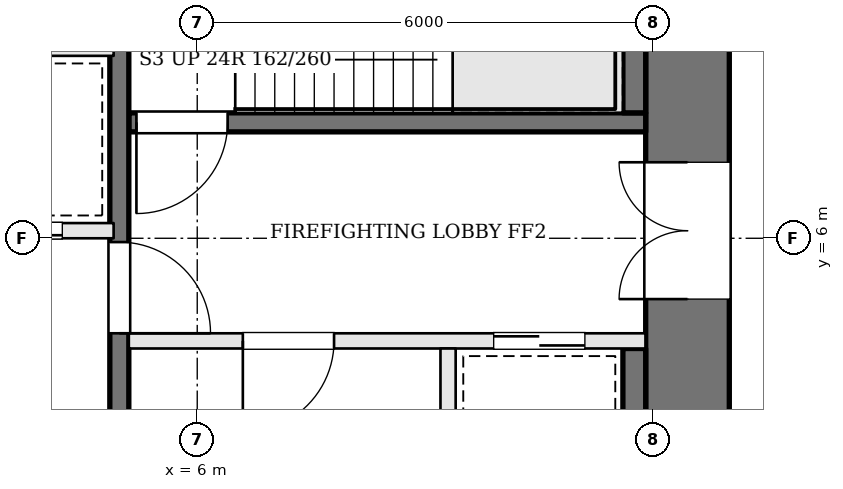
"""IFC4 building model, lengths in metres.
Left out: names, types, materials, properties, quantities, classifications, styles, units other than length and angle.
Written with IfcOpenShell. Run it as: python <this file> out.ifc"""

import sys

from ifc_helpers import new_model, si_unit, direction, frame, frame_2d, origin, place, context, subcontext, project, spatial, rectangle, extrude, element, fill, save


model = new_model("IFC4")
c1 = context("Model", 3, precision=1e-05, world=origin(), true_north=direction((0.0, 1.0)))
c2 = subcontext(c1, "Body", "Model", "MODEL_VIEW")
j1 = project(units=[si_unit("LENGTHUNIT", "METRE"), si_unit("PLANEANGLEUNIT", "RADIAN")], contexts=[c1])
p1 = place(None, origin())
s1 = spatial("IfcSite", under=j1, at=p1, CompositionType="ELEMENT")
p2 = place(p1, origin())
s2 = spatial("IfcBuilding", under=s1, at=p2, CompositionType="ELEMENT")
p3 = place(p2, frame((0.0, 0.0, 130.5)))
s3 = spatial("IfcBuildingStorey", under=s2, at=p3, CompositionType="ELEMENT", Elevation=130.5)
p4 = place(p3, frame((12.45, -1.9, 0.0), z_axis=(0.0, 0.0, 1.0), x_axis=(0.0, 1.0, 0.0)))
e1 = element("IfcWall", 1, at=p4, inside=s3, PredefinedType="SHEAR", context=c2, shape_type="SweptSolid", body=[
    extrude(rectangle(XDim=12.8, YDim=1.1, at=frame_2d((6.4, 0.0))), origin(), (0.0, 0.0, 1.0), 3.9),
])
p5 = place(p4, frame((7.1, 0.0, 0.0)))
e2 = element("IfcOpeningElement", 2, at=p5, cuts=e1, PredefinedType="OPENING", context=c2, shape_type="SweptSolid", body=[
    extrude(rectangle(XDim=1.8, YDim=2.1, at=frame_2d((0.9, 1.05))), frame((0.0, 0.56, 0.0), z_axis=(0.0, -1.0, 0.0), x_axis=(1.0, 0.0, 0.0)), (0.0, 0.0, 1.0), 1.12),
])
p6 = place(p3, frame((11.9, 7.525, 0.0), z_axis=(0.0, 0.0, 1.0), x_axis=(-1.0, 0.0, 0.0)))
e3 = element("IfcWall", 3, at=p6, inside=s3, PredefinedType="SOLIDWALL", context=c2, shape_type="SweptSolid", body=[
    extrude(rectangle(XDim=6.8, YDim=0.25, at=frame_2d((3.4, 0.0))), origin(), (0.0, 0.0, 1.0), 3.7),
])
p7 = place(p6, frame((5.5, 0.0, 0.0)))
e4 = element("IfcOpeningElement", 4, at=p7, cuts=e3, PredefinedType="OPENING", context=c2, shape_type="SweptSolid", body=[
    extrude(rectangle(XDim=1.2, YDim=2.1, at=frame_2d((0.6, 1.05))), frame((0.0, 0.135, 0.0), z_axis=(0.0, -1.0, 0.0), x_axis=(1.0, 0.0, 0.0)), (0.0, 0.0, 1.0), 0.27),
])
p8 = place(p3, frame((11.9, 4.65, 0.0), z_axis=(0.0, 0.0, 1.0), x_axis=(-1.0, 0.0, 0.0)))
e5 = element("IfcWall", 5, at=p8, inside=s3, PredefinedType="SOLIDWALL", context=c2, shape_type="SweptSolid", body=[
    extrude(rectangle(XDim=6.8, YDim=0.2, at=frame_2d((3.4, 0.0))), origin(), (0.0, 0.0, 1.0), 3.7),
])
p9 = place(p8, frame((4.1, 0.0, 0.0)))
e6 = element("IfcOpeningElement", 6, at=p9, cuts=e5, PredefinedType="OPENING", context=c2, shape_type="SweptSolid", body=[
    extrude(rectangle(XDim=1.2, YDim=2.1, at=frame_2d((0.6, 1.05))), frame((0.0, 0.11, 0.0), z_axis=(0.0, -1.0, 0.0), x_axis=(1.0, 0.0, 0.0)), (0.0, 0.0, 1.0), 0.22),
])
p10 = place(p8, frame((0.8, 0.0, 0.0)))
e7 = element("IfcOpeningElement", 7, at=p10, cuts=e5, PredefinedType="OPENING", context=c2, shape_type="SweptSolid", body=[
    extrude(rectangle(XDim=1.2, YDim=2.1, at=frame_2d((0.6, 1.05))), frame((0.0, 0.11, 0.0), z_axis=(0.0, -1.0, 0.0), x_axis=(1.0, 0.0, 0.0)), (0.0, 0.0, 1.0), 0.22),
])
p11 = place(p3, frame((9.3, 4.55, 0.0), z_axis=(0.0, 0.0, 1.0), x_axis=(0.0, -1.0, 0.0)))
e8 = element("IfcWall", 8, at=p11, inside=s3, PredefinedType="SOLIDWALL", context=c2, shape_type="SweptSolid", body=[
    extrude(rectangle(XDim=3.0, YDim=0.2, at=frame_2d((1.5, 0.0))), origin(), (0.0, 0.0, 1.0), 3.7),
])
p12 = place(p3, frame((4.975, 10.9, 0.0), z_axis=(0.0, 0.0, 1.0), x_axis=(0.0, -1.0, 0.0)))
e9 = element("IfcWall", 9, at=p12, inside=s3, PredefinedType="SOLIDWALL", context=c2, shape_type="SweptSolid", body=[
    extrude(rectangle(XDim=12.8, YDim=0.25, at=frame_2d((6.4, 0.0))), origin(), (0.0, 0.0, 1.0), 3.7),
])
p13 = place(p12, frame((4.95, 0.0, 0.0)))
e10 = element("IfcOpeningElement", 10, at=p13, cuts=e9, PredefinedType="OPENING", context=c2, shape_type="SweptSolid", body=[
    extrude(rectangle(XDim=1.2, YDim=2.1, at=frame_2d((0.6, 1.05))), frame((0.0, 0.135, 0.0), z_axis=(0.0, -1.0, 0.0), x_axis=(1.0, 0.0, 0.0)), (0.0, 0.0, 1.0), 0.27),
])
p14 = place(p3, frame((11.75, 10.6, 0.0), z_axis=(0.0, 0.0, 1.0), x_axis=(0.0, -1.0, 0.0)))
e11 = element("IfcWall", 11, at=p14, inside=s3, PredefinedType="SOLIDWALL", context=c2, shape_type="SweptSolid", body=[
    extrude(rectangle(XDim=2.95, YDim=0.3, at=frame_2d((1.475, 0.0))), origin(), (0.0, 0.0, 1.0), 3.7),
])
p15 = place(p3, frame((11.75, 4.55, 0.0), z_axis=(0.0, 0.0, 1.0), x_axis=(0.0, -1.0, 0.0)))
e12 = element("IfcWall", 12, at=p15, inside=s3, PredefinedType="SOLIDWALL", context=c2, shape_type="SweptSolid", body=[
    extrude(rectangle(XDim=3.0, YDim=0.3, at=frame_2d((1.5, 0.0))), origin(), (0.0, 0.0, 1.0), 3.7),
])
p16 = place(p3, frame((-4.9, 6.1, 0.0), z_axis=(0.0, 0.0, 1.0), x_axis=(1.0, 0.0, 0.0)))
e13 = element("IfcWall", 13, at=p16, inside=s3, PredefinedType="SOLIDWALL", context=c2, shape_type="SweptSolid", body=[
    extrude(rectangle(XDim=9.8, YDim=0.2, at=frame_2d((4.9, 0.0))), origin(), (0.0, 0.0, 1.0), 3.7),
])
p17 = place(p16, frame((0.675, 0.0, 0.0)))
e14 = element("IfcOpeningElement", 14, at=p17, cuts=e13, PredefinedType="OPENING", context=c2, shape_type="SweptSolid", body=[
    extrude(rectangle(XDim=1.1, YDim=2.1, at=frame_2d((0.55, 1.05))), frame((0.0, 0.11, 0.0), z_axis=(0.0, -1.0, 0.0), x_axis=(1.0, 0.0, 0.0)), (0.0, 0.0, 1.0), 0.22),
])
p18 = place(p16, frame((3.125, 0.0, 0.0)))
e15 = element("IfcOpeningElement", 15, at=p18, cuts=e13, PredefinedType="OPENING", context=c2, shape_type="SweptSolid", body=[
    extrude(rectangle(XDim=1.1, YDim=2.1, at=frame_2d((0.55, 1.05))), frame((0.0, 0.11, 0.0), z_axis=(0.0, -1.0, 0.0), x_axis=(1.0, 0.0, 0.0)), (0.0, 0.0, 1.0), 0.22),
])
p19 = place(p16, frame((5.575, 0.0, 0.0)))
e16 = element("IfcOpeningElement", 16, at=p19, cuts=e13, PredefinedType="OPENING", context=c2, shape_type="SweptSolid", body=[
    extrude(rectangle(XDim=1.1, YDim=2.1, at=frame_2d((0.55, 1.05))), frame((0.0, 0.11, 0.0), z_axis=(0.0, -1.0, 0.0), x_axis=(1.0, 0.0, 0.0)), (0.0, 0.0, 1.0), 0.22),
])
p20 = place(p16, frame((8.025, 0.0, 0.0)))
e17 = element("IfcOpeningElement", 17, at=p20, cuts=e13, PredefinedType="OPENING", context=c2, shape_type="SweptSolid", body=[
    extrude(rectangle(XDim=1.1, YDim=2.1, at=frame_2d((0.55, 1.05))), frame((0.0, 0.11, 0.0), z_axis=(0.0, -1.0, 0.0), x_axis=(1.0, 0.0, 0.0)), (0.0, 0.0, 1.0), 0.22),
])
p21 = place(p3, frame((-4.9, 8.5, 0.0), z_axis=(0.0, 0.0, 1.0), x_axis=(1.0, 0.0, 0.0)))
e18 = element("IfcWall", 18, at=p21, inside=s3, PredefinedType="SOLIDWALL", context=c2, shape_type="SweptSolid", body=[
    extrude(rectangle(XDim=9.8, YDim=0.2, at=frame_2d((4.9, 0.0))), origin(), (0.0, 0.0, 1.0), 3.7),
])
p22 = place(p5, origin())
e19 = element("IfcDoor", 19, at=p22, inside=s3, OperationType="DOUBLE_DOOR_SINGLE_SWING", PredefinedType="DOOR", context=c2, shape_type="SweptSolid", body=[
    extrude(rectangle(XDim=1.8, YDim=2.1, at=frame_2d((0.9, 1.05))), frame((0.0, 0.025, 0.0), z_axis=(0.0, -1.0, 0.0), x_axis=(1.0, 0.0, 0.0)), (0.0, 0.0, 1.0), 0.05),
])
fill(e2, e19)
p23 = place(p13, origin())
e20 = element("IfcDoor", 20, at=p23, inside=s3, OperationType="SINGLE_SWING_RIGHT", PredefinedType="DOOR", context=c2, shape_type="SweptSolid", body=[
    extrude(rectangle(XDim=1.2, YDim=2.1, at=frame_2d((0.6, 1.05))), frame((0.0, 0.025, 0.0), z_axis=(0.0, -1.0, 0.0), x_axis=(1.0, 0.0, 0.0)), (0.0, 0.0, 1.0), 0.05),
])
fill(e10, e20)
p24 = place(p9, origin())
e21 = element("IfcDoor", 21, at=p24, inside=s3, OperationType="SINGLE_SWING_RIGHT", PredefinedType="DOOR", context=c2, shape_type="SweptSolid", body=[
    extrude(rectangle(XDim=1.2, YDim=2.1, at=frame_2d((0.6, 1.05))), frame((0.0, 0.025, 0.0), z_axis=(0.0, -1.0, 0.0), x_axis=(1.0, 0.0, 0.0)), (0.0, 0.0, 1.0), 0.05),
])
fill(e6, e21)
p25 = place(p7, origin())
e22 = element("IfcDoor", 22, at=p25, inside=s3, OperationType="SINGLE_SWING_RIGHT", PredefinedType="DOOR", context=c2, shape_type="SweptSolid", body=[
    extrude(rectangle(XDim=1.2, YDim=2.1, at=frame_2d((0.6, 1.05))), frame((0.0, 0.025, 0.0), z_axis=(0.0, -1.0, 0.0), x_axis=(1.0, 0.0, 0.0)), (0.0, 0.0, 1.0), 0.05),
])
fill(e4, e22)
p26 = place(p10, origin())
e23 = element("IfcDoor", 23, at=p26, inside=s3, OperationType="SLIDING_TO_RIGHT", PredefinedType="DOOR", context=c2, shape_type="SweptSolid", body=[
    extrude(rectangle(XDim=1.2, YDim=2.1, at=frame_2d((0.6, 1.05))), frame((0.0, 0.025, 0.0), z_axis=(0.0, -1.0, 0.0), x_axis=(1.0, 0.0, 0.0)), (0.0, 0.0, 1.0), 0.05),
])
fill(e7, e23)
p27 = place(p20, origin())
e24 = element("IfcDoor", 24, at=p27, inside=s3, OperationType="SLIDING_TO_LEFT", PredefinedType="DOOR", context=c2, shape_type="SweptSolid", body=[
    extrude(rectangle(XDim=1.1, YDim=2.1, at=frame_2d((0.55, 1.05))), frame((0.0, 0.025, 0.0), z_axis=(0.0, -1.0, 0.0), x_axis=(1.0, 0.0, 0.0)), (0.0, 0.0, 1.0), 0.05),
])
fill(e17, e24)
save(model, sys.argv[1])
